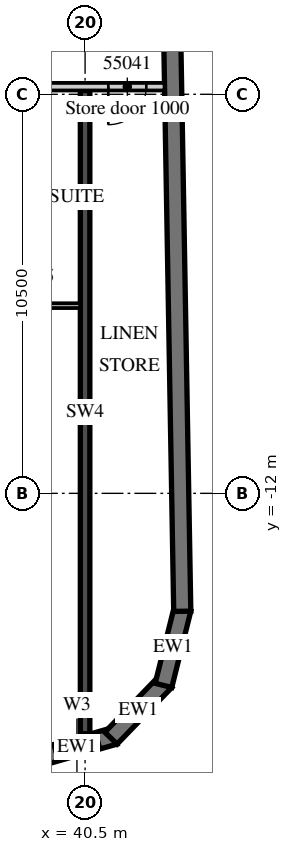
"""IFC4 building model, lengths in metres.
Left out: names, types, materials, properties, quantities, classifications, styles, units other than length and angle.
Written with IfcOpenShell. Run it as: python <this file> out.ifc"""

import sys

from ifc_helpers import new_model, si_unit, direction, frame, frame_2d, origin, place, context, subcontext, project, spatial, polyline, rectangle, outline, extrude, element, fill, save


model = new_model("IFC4")
c1 = context("Model", 3, precision=1e-05, world=origin(), true_north=direction((0.0, 1.0)))
c2 = subcontext(c1, "Body", "Model", "MODEL_VIEW")
j1 = project(units=[si_unit("LENGTHUNIT", "METRE"), si_unit("PLANEANGLEUNIT", "RADIAN")], contexts=[c1])
p1 = place(None, origin())
s1 = spatial("IfcSite", under=j1, at=p1, CompositionType="ELEMENT")
p2 = place(p1, origin())
s2 = spatial("IfcBuilding", under=s1, at=p2, CompositionType="ELEMENT")
p3 = place(p2, frame((0.0, 0.0, 227.6)))
s3 = spatial("IfcBuildingStorey", under=s2, at=p3, CompositionType="ELEMENT", Elevation=227.6)
p4 = place(p3, frame((40.5, -18.325, 0.0), z_axis=(0.0, 0.0, 1.0), x_axis=(0.0, 1.0, 0.0)))
e1 = element("IfcWall", 1, at=p4, inside=s3, PredefinedType="SHEAR", context=c2, shape_type="SweptSolid", body=[
    extrude(rectangle(XDim=16.925, YDim=0.25, at=frame_2d((8.463, 0.0))), origin(), (0.0, 0.0, 1.0), 3.3),
])
p5 = place(p3, frame((39.29, -18.952, 0.0), z_axis=(0.0, 0.0, 1.0), x_axis=(0.961247584925, 0.275686562016, 0.0)))
e2 = element("IfcWall", 2, at=p5, inside=s3, PredefinedType="SOLIDWALL", context=c2, shape_type="SweptSolid", body=[
    extrude(outline(polyline([(0.0, -0.225), (2.071, -0.225), (1.95, 0.225), (0.121, 0.225), (0.0, -0.225)])), origin(), (0.0, 0.0, 1.0), 3.02),
])
p6 = place(p5, frame((0.435, 0.0, 0.45)))
e3 = element("IfcOpeningElement", 3, at=p6, cuts=e2, PredefinedType="OPENING", context=c2, shape_type="SweptSolid", body=[
    extrude(rectangle(XDim=1.2, YDim=2.25, at=frame_2d((0.6, 1.125))), frame((0.0, 0.235, 0.0), z_axis=(0.0, -1.0, 0.0), x_axis=(1.0, 0.0, 0.0)), (0.0, 0.0, 1.0), 0.47),
])
p7 = place(p3, frame((41.181, -18.442, 0.0), z_axis=(0.0, 0.0, 1.0), x_axis=(0.694678672846, 0.719320193998, 0.0)))
e4 = element("IfcWall", 4, at=p7, inside=s3, PredefinedType="SOLIDWALL", context=c2, shape_type="SweptSolid", body=[
    extrude(outline(polyline([(0.0, -0.225), (2.071, -0.225), (1.95, 0.225), (0.121, 0.225), (0.0, -0.225)])), origin(), (0.0, 0.0, 1.0), 3.02),
])
p8 = place(p3, frame((42.563, -17.054, 0.0), z_axis=(0.0, 0.0, 1.0), x_axis=(0.241841950319, 0.970315655375, 0.0)))
e5 = element("IfcWall", 5, at=p8, inside=s3, PredefinedType="SOLIDWALL", context=c2, shape_type="SweptSolid", body=[
    extrude(outline(polyline([(0.0, -0.225), (2.071, -0.225), (1.95, 0.225), (0.121, 0.225), (0.0, -0.225)])), origin(), (0.0, 0.0, 1.0), 3.02),
])
p9 = place(p3, frame((43.057, -15.103, 0.0), z_axis=(0.0, 0.0, 1.0), x_axis=(-0.017452408953, 0.999847695112, 0.0)))
e6 = element("IfcWall", 6, at=p9, inside=s3, PredefinedType="SOLIDWALL", context=c2, shape_type="SweptSolid", body=[
    extrude(rectangle(XDim=33.0, YDim=0.45, at=frame_2d((16.5, 0.0))), origin(), (0.0, 0.0, 1.0), 3.02),
])
p10 = place(p3, frame((13.5, -1.3, 0.0), z_axis=(0.0, 0.0, 1.0), x_axis=(1.0, 0.0, 0.0)))
e7 = element("IfcWall", 7, at=p10, inside=s3, PredefinedType="PARTITIONING", context=c2, shape_type="SweptSolid", body=[
    extrude(rectangle(XDim=29.091, YDim=0.2, at=frame_2d((14.545, 0.0))), origin(), (0.0, 0.0, 1.0), 3.02),
])
p11 = place(p10, frame((0.575, 0.0, 0.0)))
e8 = element("IfcOpeningElement", 8, at=p11, cuts=e7, PredefinedType="OPENING", context=c2, shape_type="SweptSolid", body=[
    extrude(rectangle(XDim=1.0, YDim=2.1, at=frame_2d((0.5, 1.05))), frame((0.0, 0.11, 0.0), z_axis=(0.0, -1.0, 0.0), x_axis=(1.0, 0.0, 0.0)), (0.0, 0.0, 1.0), 0.22),
])
p12 = place(p10, frame((5.075, 0.0, 0.0)))
e9 = element("IfcOpeningElement", 9, at=p12, cuts=e7, PredefinedType="OPENING", context=c2, shape_type="SweptSolid", body=[
    extrude(rectangle(XDim=1.0, YDim=2.1, at=frame_2d((0.5, 1.05))), frame((0.0, 0.11, 0.0), z_axis=(0.0, -1.0, 0.0), x_axis=(1.0, 0.0, 0.0)), (0.0, 0.0, 1.0), 0.22),
])
p13 = place(p10, frame((9.55, 0.0, 0.0)))
e10 = element("IfcOpeningElement", 10, at=p13, cuts=e7, PredefinedType="OPENING", context=c2, shape_type="SweptSolid", body=[
    extrude(rectangle(XDim=1.0, YDim=2.1, at=frame_2d((0.5, 1.05))), frame((0.0, 0.11, 0.0), z_axis=(0.0, -1.0, 0.0), x_axis=(1.0, 0.0, 0.0)), (0.0, 0.0, 1.0), 0.22),
])
p14 = place(p10, frame((18.862, 0.0, 0.0)))
e11 = element("IfcOpeningElement", 11, at=p14, cuts=e7, PredefinedType="OPENING", context=c2, shape_type="SweptSolid", body=[
    extrude(rectangle(XDim=1.2, YDim=2.1, at=frame_2d((0.6, 1.05))), frame((0.0, 0.11, 0.0), z_axis=(0.0, -1.0, 0.0), x_axis=(1.0, 0.0, 0.0)), (0.0, 0.0, 1.0), 0.22),
])
p15 = place(p10, frame((23.075, 0.0, 0.0)))
e12 = element("IfcOpeningElement", 12, at=p15, cuts=e7, PredefinedType="OPENING", context=c2, shape_type="SweptSolid", body=[
    extrude(rectangle(XDim=1.0, YDim=2.1, at=frame_2d((0.5, 1.05))), frame((0.0, 0.11, 0.0), z_axis=(0.0, -1.0, 0.0), x_axis=(1.0, 0.0, 0.0)), (0.0, 0.0, 1.0), 0.22),
])
p16 = place(p10, frame((27.611, 0.0, 0.0)))
e13 = element("IfcOpeningElement", 13, at=p16, cuts=e7, PredefinedType="OPENING", context=c2, shape_type="SweptSolid", body=[
    extrude(rectangle(XDim=1.0, YDim=2.4, at=frame_2d((0.5, 1.2))), frame((0.0, 0.11, 0.0), z_axis=(0.0, -1.0, 0.0), x_axis=(1.0, 0.0, 0.0)), (0.0, 0.0, 1.0), 0.22),
])
p17 = place(p3, frame((38.15, -7.062, 0.0), z_axis=(0.0, 0.0, 1.0), x_axis=(1.0, 0.0, 0.0)))
e14 = element("IfcWall", 14, at=p17, inside=s3, PredefinedType="PARTITIONING", context=c2, shape_type="SweptSolid", body=[
    extrude(rectangle(XDim=2.225, YDim=0.125, at=frame_2d((1.113, 0.0))), origin(), (0.0, 0.0, 1.0), 3.02),
])
p18 = place(p6, origin())
e15 = element("IfcWindow", 15, at=p18, inside=s3, PartitioningType="SINGLE_PANEL", PredefinedType="WINDOW", context=c2, shape_type="SweptSolid", body=[
    extrude(rectangle(XDim=1.2, YDim=2.25, at=frame_2d((0.6, 1.125))), frame((0.0, 0.09, 0.0), z_axis=(0.0, -1.0, 0.0), x_axis=(1.0, 0.0, 0.0)), (0.0, 0.0, 1.0), 0.06),
])
fill(e3, e15)
p19 = place(p16, origin())
e16 = element("IfcDoor", 16, at=p19, inside=s3, OperationType="SINGLE_SWING_LEFT", PredefinedType="DOOR", context=c2, shape_type="SweptSolid", body=[
    extrude(rectangle(XDim=1.0, YDim=2.4, at=frame_2d((0.5, 1.2))), frame((0.0, 0.025, 0.0), z_axis=(0.0, -1.0, 0.0), x_axis=(1.0, 0.0, 0.0)), (0.0, 0.0, 1.0), 0.05),
])
fill(e13, e16)
save(model, sys.argv[1])
